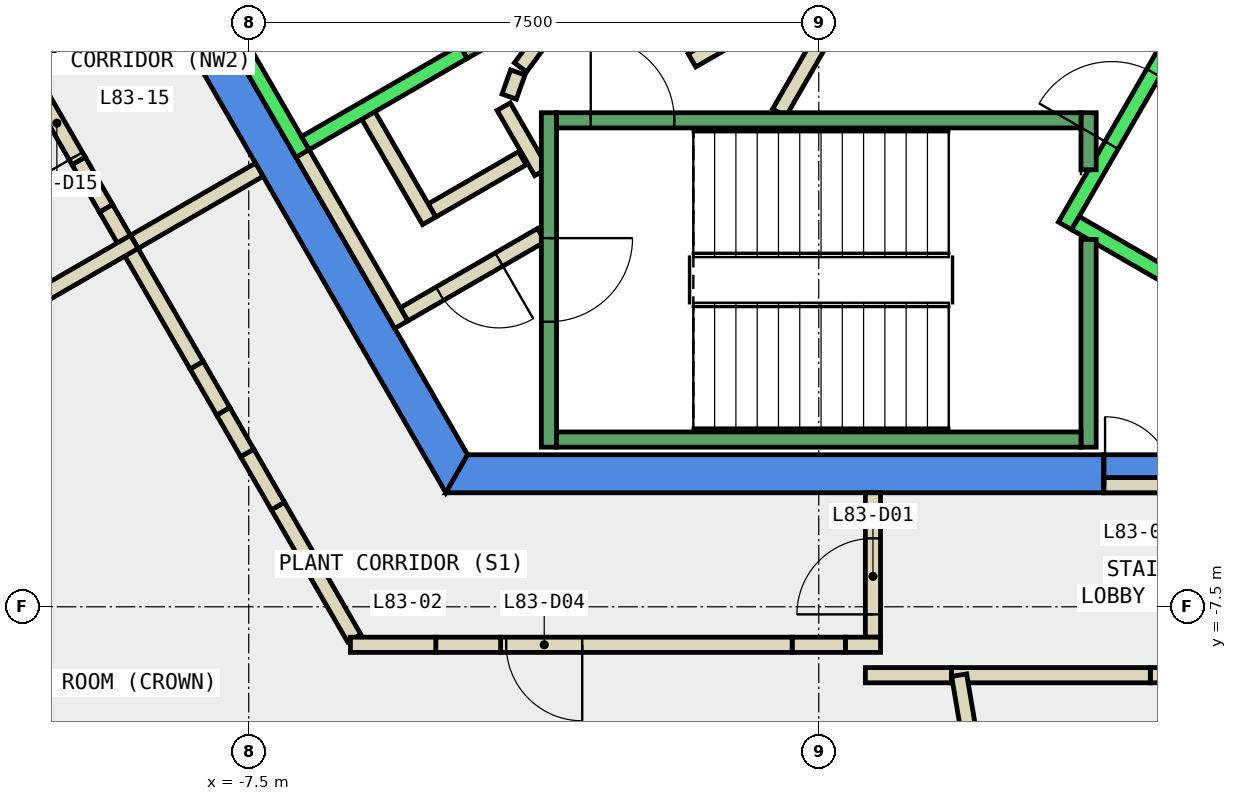
"""IFC4 building model, lengths in metres.
Left out: names, types, materials, properties, quantities, classifications, styles, units other than length and angle.
Written with IfcOpenShell. Run it as: python <this file> out.ifc"""

import sys

from ifc_helpers import new_model, si_unit, direction, frame, frame_2d, origin, place, context, subcontext, project, spatial, polyline, rectangle, outline, extrude, element, fill, save


model = new_model("IFC4")
c1 = context("Model", 3, precision=1e-05, world=origin(), true_north=direction((0.0, 1.0)))
c2 = subcontext(c1, "Body", "Model", "MODEL_VIEW")
j1 = project(units=[si_unit("LENGTHUNIT", "METRE"), si_unit("PLANEANGLEUNIT", "RADIAN")], contexts=[c1])
p1 = place(None, origin())
s1 = spatial("IfcSite", under=j1, at=p1, CompositionType="ELEMENT")
p2 = place(p1, origin())
s2 = spatial("IfcBuilding", under=s1, at=p2, CompositionType="ELEMENT")
p3 = place(p2, frame((0.0, 0.0, 353.9)))
s3 = spatial("IfcBuildingStorey", under=s2, at=p3, CompositionType="ELEMENT", Elevation=353.9)
p4 = place(p3, frame((0.0, 0.0, -0.35)))
e1 = element("IfcWall", 1, at=p4, inside=s3, PredefinedType="SHEAR", context=c2, shape_type="SweptSolid", body=[
    extrude(outline(polyline([(-9.815, 2.5), (-4.907, -6.0), (-4.619, -5.5), (-9.238, 2.5), (-9.815, 2.5)])), origin(), (0.0, 0.0, 1.0), 4.4),
])
p5 = place(p3, frame((0.0, 0.0, -0.35)))
e2 = element("IfcWall", 2, at=p5, inside=s3, PredefinedType="SHEAR", context=c2, shape_type="SweptSolid", body=[
    extrude(outline(polyline([(3.75, -6.0), (3.75, -5.5), (-4.619, -5.5), (-4.907, -6.0), (3.75, -6.0)])), origin(), (0.0, 0.0, 1.0), 4.4),
])
p6 = place(p3, frame((0.0, 0.0, 3.6)))
e3 = element("IfcWall", 3, at=p6, inside=s3, PredefinedType="SHEAR", context=c2, shape_type="SweptSolid", body=[
    extrude(outline(polyline([(4.676, -6.0), (4.676, -5.6), (4.619, -5.5), (3.75, -5.5), (3.75, -6.0), (4.676, -6.0)])), origin(), (0.0, 0.0, 1.0), 0.45),
])
p7 = place(p3, frame((-3.9, -1.599, 0.0), z_axis=(0.0, 0.0, 1.0), x_axis=(-0.865969445389, -0.500096910261, 0.0)))
e4 = element("IfcWall", 4, at=p7, inside=s3, PredefinedType="PARTITIONING", context=c2, shape_type="SweptSolid", body=[
    extrude(rectangle(XDim=1.373, YDim=0.2, at=frame_2d((0.687, 0.0))), origin(), (0.0, 0.0, 1.0), 4.05),
])
p8 = place(p3, frame((-5.126, -2.422, 0.0), z_axis=(0.0, 0.0, 1.0), x_axis=(-0.500062241894, 0.865989465428, 0.0)))
e5 = element("IfcWall", 5, at=p8, inside=s3, PredefinedType="PARTITIONING", context=c2, shape_type="SweptSolid", body=[
    extrude(rectangle(XDim=1.7, YDim=0.2, at=frame_2d((0.85, 0.0))), origin(), (0.0, 0.0, 1.0), 4.05),
])
p9 = place(p3, frame((-5.492, -3.788, 0.0), z_axis=(0.0, 0.0, 1.0), x_axis=(-0.500008949224, 0.866020236886, 0.0)))
e6 = element("IfcWall", 6, at=p9, inside=s3, PredefinedType="PARTITIONING", context=c2, shape_type="SweptSolid", body=[
    extrude(rectangle(XDim=2.68, YDim=0.2, at=frame_2d((1.34, 0.0))), origin(), (0.0, 0.0, 1.0), 4.05),
])
p10 = place(p3, frame((-4.145, -0.92, 0.0), z_axis=(0.0, 0.0, 1.0), x_axis=(0.499743786207, -0.866173278362, 0.0)))
e7 = element("IfcWall", 7, at=p10, inside=s3, PredefinedType="PARTITIONING", context=c2, shape_type="SweptSolid", body=[
    extrude(rectangle(XDim=0.991, YDim=0.2, at=frame_2d((0.495, 0.0))), origin(), (0.0, 0.0, 1.0), 4.05),
])
p11 = place(p3, frame((-3.65, -2.61, 0.0), z_axis=(0.0, 0.0, 1.0), x_axis=(-0.866072462134, -0.499918483688, 0.0)))
e8 = element("IfcWall", 8, at=p11, inside=s3, PredefinedType="PARTITIONING", context=c2, shape_type="SweptSolid", body=[
    extrude(rectangle(XDim=2.084, YDim=0.2, at=frame_2d((1.042, 0.0))), origin(), (0.0, 0.0, 1.0), 4.05),
])
p12 = place(p11, frame((0.642, 0.0, 0.0)))
e9 = element("IfcOpeningElement", 9, at=p12, cuts=e8, PredefinedType="OPENING", context=c2, shape_type="SweptSolid", body=[
    extrude(rectangle(XDim=0.9, YDim=2.1, at=frame_2d((0.45, 1.05))), frame((0.0, 0.11, 0.0), z_axis=(0.0, -1.0, 0.0), x_axis=(1.0, 0.0, 0.0)), (0.0, 0.0, 1.0), 0.22),
])
p13 = place(p3, frame((-0.52, -1.0, 0.0), z_axis=(0.0, 0.0, 1.0), x_axis=(0.50011622646, 0.865958290007, 0.0)))
e10 = element("IfcWall", 10, at=p13, inside=s3, PredefinedType="PARTITIONING", context=c2, shape_type="SweptSolid", body=[
    extrude(rectangle(XDim=4.991, YDim=0.2, at=frame_2d((2.496, 0.0))), origin(), (0.0, 0.0, 1.0), 4.05),
])
p14 = place(p13, frame((1.945, 0.0, 0.0)))
e11 = element("IfcOpeningElement", 11, at=p14, cuts=e10, PredefinedType="OPENING", context=c2, shape_type="SweptSolid", body=[
    extrude(rectangle(XDim=1.0, YDim=2.1, at=frame_2d((0.5, 1.05))), frame((0.0, 0.11, 0.0), z_axis=(0.0, -1.0, 0.0), x_axis=(1.0, 0.0, 0.0)), (0.0, 0.0, 1.0), 0.22),
])
p15 = place(p3, frame((-0.412, 0.414, 0.0), z_axis=(0.0, 0.0, 1.0), x_axis=(-0.866017369001, -0.500013916395, 0.0)))
e12 = element("IfcWall", 12, at=p15, inside=s3, PredefinedType="PARTITIONING", context=c2, shape_type="SweptSolid", body=[
    extrude(rectangle(XDim=1.45, YDim=0.2, at=frame_2d((0.725, 0.0))), origin(), (0.0, 0.0, 1.0), 4.05),
])
p16 = place(p3, frame((-3.723, -0.131, 0.0), z_axis=(0.0, 0.0, 1.0), x_axis=(-0.594675113454, -0.803966112121, 0.0)))
e13 = element("IfcWall", 13, at=p16, inside=s3, PredefinedType="PARTITIONING", context=c2, shape_type="SweptSolid", body=[
    extrude(rectangle(XDim=0.338, YDim=0.2, at=frame_2d((0.169, 0.0))), origin(), (0.0, 0.0, 1.0), 4.05),
])
p17 = place(p3, frame((-3.96, -0.47, 0.0), z_axis=(0.0, 0.0, 1.0), x_axis=(-0.334824194261, -0.942280615813, 0.0)))
e14 = element("IfcWall", 14, at=p17, inside=s3, PredefinedType="PARTITIONING", context=c2, shape_type="SweptSolid", body=[
    extrude(rectangle(XDim=0.338, YDim=0.2, at=frame_2d((0.169, 0.0))), origin(), (0.0, 0.0, 1.0), 4.05),
])
p18 = place(p3, frame((0.713, -7.9, 0.0), z_axis=(0.0, 0.0, 1.0), x_axis=(0.0, 1.0, 0.0)))
e15 = element("IfcWall", 15, at=p18, inside=s3, PredefinedType="PARTITIONING", context=c2, shape_type="SweptSolid", body=[
    extrude(rectangle(XDim=1.9, YDim=0.2, at=frame_2d((0.95, 0.0))), origin(), (0.0, 0.0, 1.0), 4.05),
])
p19 = place(p18, frame((0.3, 0.0, 0.0)))
e16 = element("IfcOpeningElement", 16, at=p19, cuts=e15, PredefinedType="OPENING", context=c2, shape_type="SweptSolid", body=[
    extrude(rectangle(XDim=1.0, YDim=2.1, at=frame_2d((0.5, 1.05))), frame((0.0, 0.11, 0.0), z_axis=(0.0, -1.0, 0.0), x_axis=(1.0, 0.0, 0.0)), (0.0, 0.0, 1.0), 0.22),
])
p20 = place(p3, frame((1.747, -8.4, 0.0), z_axis=(0.0, 0.0, 1.0), x_axis=(-1.0, 0.0, 0.0)))
e17 = element("IfcWall", 17, at=p20, inside=s3, PredefinedType="PARTITIONING", context=c2, shape_type="SweptSolid", body=[
    extrude(rectangle(XDim=1.134, YDim=0.2, at=frame_2d((0.567, 0.0))), origin(), (0.0, 0.0, 1.0), 4.05),
])
p21 = place(p3, frame((0.813, -8.0, 0.0), z_axis=(0.0, 0.0, 1.0), x_axis=(-1.0, 0.0, 0.0)))
e18 = element("IfcWall", 18, at=p21, inside=s3, PredefinedType="PARTITIONING", context=c2, shape_type="SweptSolid", body=[
    extrude(rectangle(XDim=0.463, YDim=0.2, at=frame_2d((0.231, 0.0))), origin(), (0.0, 0.0, 1.0), 4.05),
])
p22 = place(p3, frame((-6.112, -7.913, 0.0), z_axis=(0.0, 0.0, 1.0), x_axis=(-0.499957508411, 0.866049934925, 0.0)))
e19 = element("IfcWall", 19, at=p22, inside=s3, PredefinedType="PARTITIONING", context=c2, shape_type="SweptSolid", body=[
    extrude(rectangle(XDim=2.008, YDim=0.2, at=frame_2d((1.004, 0.0))), origin(), (0.0, 0.0, 1.0), 4.05),
])
p23 = place(p3, frame((-9.006, -2.7, 0.0), z_axis=(0.0, 0.0, 1.0), x_axis=(0.865980106173, 0.500078449558, 0.0)))
e20 = element("IfcWall", 20, at=p23, inside=s3, PredefinedType="PARTITIONING", context=c2, shape_type="SweptSolid", body=[
    extrude(rectangle(XDim=1.9, YDim=0.2, at=frame_2d((0.95, 0.0))), origin(), (0.0, 0.0, 1.0), 4.05),
])
p24 = place(p3, frame((-9.093, -2.75, 0.0), z_axis=(0.0, 0.0, 1.0), x_axis=(-0.500427620203, 0.86577837634, 0.0)))
e21 = element("IfcWall", 21, at=p24, inside=s3, PredefinedType="PARTITIONING", context=c2, shape_type="SweptSolid", body=[
    extrude(rectangle(XDim=0.569, YDim=0.2, at=frame_2d((0.285, 0.0))), origin(), (0.0, 0.0, 1.0), 4.05),
])
p25 = place(p3, frame((3.75, -5.9, 0.0), z_axis=(0.0, 0.0, 1.0), x_axis=(1.0, 0.0, 0.0)))
e22 = element("IfcWall", 22, at=p25, inside=s3, PredefinedType="PARTITIONING", context=c2, shape_type="SweptSolid", body=[
    extrude(rectangle(XDim=0.926, YDim=0.2, at=frame_2d((0.463, 0.0))), origin(), (0.0, 0.0, 1.0), 2.4),
])
p26 = place(p25, frame((0.017, 0.0, 0.0)))
e23 = element("IfcOpeningElement", 23, at=p26, cuts=e22, PredefinedType="OPENING", context=c2, shape_type="SweptSolid", body=[
    extrude(rectangle(XDim=0.9, YDim=2.1, at=frame_2d((0.45, 1.05))), frame((0.0, 0.11, 0.0), z_axis=(0.0, -1.0, 0.0), x_axis=(1.0, 0.0, 0.0)), (0.0, 0.0, 1.0), 0.22),
])
p27 = place(p3, frame((5.215, -8.4, 0.0), z_axis=(0.0, 0.0, 1.0), x_axis=(-1.0, 0.0, 0.0)))
e24 = element("IfcWall", 24, at=p27, inside=s3, PredefinedType="PARTITIONING", context=c2, shape_type="SweptSolid", body=[
    extrude(rectangle(XDim=0.853, YDim=0.2, at=frame_2d((0.427, 0.0))), origin(), (0.0, 0.0, 1.0), 1.95),
])
p28 = place(p3, frame((4.362, -8.4, 0.0), z_axis=(0.0, 0.0, 1.0), x_axis=(-1.0, 0.0, 0.0)))
e25 = element("IfcWall", 25, at=p28, inside=s3, PredefinedType="PARTITIONING", context=c2, shape_type="SweptSolid", body=[
    extrude(rectangle(XDim=2.615, YDim=0.2, at=frame_2d((1.308, 0.0))), origin(), (0.0, 0.0, 1.0), 4.05),
])
p29 = place(p3, frame((0.35, -8.0, 0.0), z_axis=(0.0, 0.0, 1.0), x_axis=(-1.0, 0.0, 0.0)))
e26 = element("IfcWall", 26, at=p29, inside=s3, PredefinedType="PARTITIONING", context=c2, shape_type="SweptSolid", body=[
    extrude(rectangle(XDim=0.7, YDim=0.2, at=frame_2d((0.35, 0.0))), origin(), (0.0, 0.0, 1.0), 1.95),
])
p30 = place(p3, frame((-0.35, -8.0, 0.0), z_axis=(0.0, 0.0, 1.0), x_axis=(-1.0, 0.0, 0.0)))
e27 = element("IfcWall", 27, at=p30, inside=s3, PredefinedType="PARTITIONING", context=c2, shape_type="SweptSolid", body=[
    extrude(rectangle(XDim=3.836, YDim=0.2, at=frame_2d((1.918, 0.0))), origin(), (0.0, 0.0, 1.0), 4.05),
])
p31 = place(p30, frame((2.762, 0.0, 0.0)))
e28 = element("IfcOpeningElement", 28, at=p31, cuts=e27, PredefinedType="OPENING", context=c2, shape_type="SweptSolid", body=[
    extrude(rectangle(XDim=1.0, YDim=2.1, at=frame_2d((0.5, 1.05))), frame((0.0, 0.11, 0.0), z_axis=(0.0, -1.0, 0.0), x_axis=(1.0, 0.0, 0.0)), (0.0, 0.0, 1.0), 0.22),
])
p32 = place(p3, frame((-4.186, -8.0, 0.0), z_axis=(0.0, 0.0, 1.0), x_axis=(-1.0, 0.0, 0.0)))
e29 = element("IfcWall", 29, at=p32, inside=s3, PredefinedType="PARTITIONING", context=c2, shape_type="SweptSolid", body=[
    extrude(rectangle(XDim=0.853, YDim=0.2, at=frame_2d((0.427, 0.0))), origin(), (0.0, 0.0, 1.0), 1.95),
])
p33 = place(p3, frame((-5.039, -8.0, 0.0), z_axis=(0.0, 0.0, 1.0), x_axis=(-1.0, 0.0, 0.0)))
e30 = element("IfcWall", 30, at=p33, inside=s3, PredefinedType="PARTITIONING", context=c2, shape_type="SweptSolid", body=[
    extrude(rectangle(XDim=1.123, YDim=0.2, at=frame_2d((0.562, 0.0))), origin(), (0.0, 0.0, 1.0), 4.05),
])
p34 = place(p3, frame((-7.116, -6.174, 0.0), z_axis=(0.0, 0.0, 1.0), x_axis=(-0.500463994258, 0.865757350792, 0.0)))
e31 = element("IfcWall", 31, at=p34, inside=s3, PredefinedType="PARTITIONING", context=c2, shape_type="SweptSolid", body=[
    extrude(rectangle(XDim=0.807, YDim=0.2, at=frame_2d((0.404, 0.0))), origin(), (0.0, 0.0, 1.0), 1.95),
])
p35 = place(p3, frame((-7.52, -5.475, 0.0), z_axis=(0.0, 0.0, 1.0), x_axis=(-0.49888522925, 0.866668061046, 0.0)))
e32 = element("IfcWall", 32, at=p35, inside=s3, PredefinedType="PARTITIONING", context=c2, shape_type="SweptSolid", body=[
    extrude(rectangle(XDim=0.631, YDim=0.2, at=frame_2d((0.316, 0.0))), origin(), (0.0, 0.0, 1.0), 4.05),
])
p36 = place(p3, frame((-7.835, -4.928, 0.0), z_axis=(0.0, 0.0, 1.0), x_axis=(-0.500265973451, 0.865871789474, 0.0)))
e33 = element("IfcWall", 33, at=p36, inside=s3, PredefinedType="PARTITIONING", context=c2, shape_type="SweptSolid", body=[
    extrude(rectangle(XDim=0.7, YDim=0.2, at=frame_2d((0.35, 0.0))), origin(), (0.0, 0.0, 1.0), 1.95),
])
p37 = place(p3, frame((-8.185, -4.322, 0.0), z_axis=(0.0, 0.0, 1.0), x_axis=(-0.500145398563, 0.865941441609, 0.0)))
e34 = element("IfcWall", 34, at=p37, inside=s3, PredefinedType="PARTITIONING", context=c2, shape_type="SweptSolid", body=[
    extrude(rectangle(XDim=1.815, YDim=0.2, at=frame_2d((0.908, 0.0))), origin(), (0.0, 0.0, 1.0), 4.05),
])
p38 = place(p3, frame((2.482, -12.149, 0.0), z_axis=(0.0, 0.0, 1.0), x_axis=(-0.167001385459, 0.985956660941, 0.0)))
e35 = element("IfcWall", 35, at=p38, inside=s3, PredefinedType="PARTITIONING", context=c2, shape_type="SweptSolid", body=[
    extrude(rectangle(XDim=3.802, YDim=0.2, at=frame_2d((1.901, 0.0))), origin(), (0.0, 0.0, 1.0), 4.05),
])
p39 = place(p3, frame((-16.43, -6.986, 0.0), z_axis=(0.0, 0.0, 1.0), x_axis=(0.866026229868, 0.499998569178, 0.0)))
e36 = element("IfcWall", 36, at=p39, inside=s3, PredefinedType="PARTITIONING", context=c2, shape_type="SweptSolid", body=[
    extrude(rectangle(XDim=8.572, YDim=0.2, at=frame_2d((4.286, 0.0))), origin(), (0.0, 0.0, 1.0), 4.05),
])
p40 = place(p3, frame((-9.378, -2.257, 0.0), z_axis=(0.0, 0.0, 1.0), x_axis=(-0.499820234884, 0.866129166349, 0.0)))
e37 = element("IfcWall", 37, at=p40, inside=s3, PredefinedType="PARTITIONING", context=c2, shape_type="SweptSolid", body=[
    extrude(rectangle(XDim=0.72, YDim=0.2, at=frame_2d((0.36, 0.0))), origin(), (0.0, 0.0, 1.0), 1.95),
])
p41 = place(p3, frame((-9.738, -1.633, 0.0), z_axis=(0.0, 0.0, 1.0), x_axis=(-0.500238469565, 0.865887679533, 0.0)))
e38 = element("IfcWall", 38, at=p41, inside=s3, PredefinedType="PARTITIONING", context=c2, shape_type="SweptSolid", body=[
    extrude(rectangle(XDim=1.351, YDim=0.2, at=frame_2d((0.676, 0.0))), origin(), (0.0, 0.0, 1.0), 4.05),
])
p42 = place(p41, frame((0.072, 0.0, 0.0)))
e39 = element("IfcOpeningElement", 39, at=p42, cuts=e38, PredefinedType="OPENING", context=c2, shape_type="SweptSolid", body=[
    extrude(rectangle(XDim=1.0, YDim=2.1, at=frame_2d((0.5, 1.05))), frame((0.0, 0.11, 0.0), z_axis=(0.0, -1.0, 0.0), x_axis=(1.0, 0.0, 0.0)), (0.0, 0.0, 1.0), 0.22),
])
p43 = place(p3, frame((-5.94, 2.188, 0.0), z_axis=(0.0, 0.0, 1.0), x_axis=(0.49994636267, -0.866056369097, 0.0)))
e40 = element("IfcWall", 40, at=p43, inside=s3, PredefinedType="STANDARD", context=c2, shape_type="SweptSolid", body=[
    extrude(rectangle(XDim=2.8, YDim=0.2, at=frame_2d((1.4, 0.0))), origin(), (0.0, 0.0, 1.0), 4.05),
])
p44 = place(p43, frame((1.225, 0.0, 0.0)))
e41 = element("IfcOpeningElement", 41, at=p44, cuts=e40, PredefinedType="OPENING", context=c2, shape_type="SweptSolid", body=[
    extrude(rectangle(XDim=1.1, YDim=2.1, at=frame_2d((0.55, 1.05))), frame((0.0, 0.11, 0.0), z_axis=(0.0, -1.0, 0.0), x_axis=(1.0, 0.0, 0.0)), (0.0, 0.0, 1.0), 0.22),
])
p45 = place(p3, frame((-8.192, 0.888, 0.0), z_axis=(0.0, 0.0, 1.0), x_axis=(0.49994636267, -0.866056369097, 0.0)))
e42 = element("IfcWall", 42, at=p45, inside=s3, PredefinedType="STANDARD", context=c2, shape_type="SweptSolid", body=[
    extrude(rectangle(XDim=2.8, YDim=0.2, at=frame_2d((1.4, 0.0))), origin(), (0.0, 0.0, 1.0), 4.05),
])
p46 = place(p3, frame((-4.677, -0.2, 0.0), z_axis=(0.0, 0.0, 1.0), x_axis=(-0.865973769406, -0.500089422704, 0.0)))
e43 = element("IfcWall", 43, at=p46, inside=s3, PredefinedType="STANDARD", context=c2, shape_type="SweptSolid", body=[
    extrude(rectangle(XDim=2.399, YDim=0.2, at=frame_2d((1.2, 0.0))), origin(), (0.0, 0.0, 1.0), 4.05),
])
p47 = place(p3, frame((3.24, -2.488, 0.0), z_axis=(0.0, 0.0, 1.0), x_axis=(0.49994636267, 0.866056369097, 0.0)))
e44 = element("IfcWall", 44, at=p47, inside=s3, PredefinedType="STANDARD", context=c2, shape_type="SweptSolid", body=[
    extrude(rectangle(XDim=2.8, YDim=0.2, at=frame_2d((1.4, 0.0))), origin(), (0.0, 0.0, 1.0), 4.05),
])
p48 = place(p47, frame((1.225, 0.0, 0.0)))
e45 = element("IfcOpeningElement", 45, at=p48, cuts=e44, PredefinedType="OPENING", context=c2, shape_type="SweptSolid", body=[
    extrude(rectangle(XDim=1.1, YDim=2.1, at=frame_2d((0.55, 1.05))), frame((0.0, 0.11, 0.0), z_axis=(0.0, -1.0, 0.0), x_axis=(1.0, 0.0, 0.0)), (0.0, 0.0, 1.0), 0.22),
])
p49 = place(p3, frame((3.377, -2.452, 0.0), z_axis=(0.0, 0.0, 1.0), x_axis=(0.865955154139, -0.50012165622, 0.0)))
e46 = element("IfcWall", 46, at=p49, inside=s3, PredefinedType="STANDARD", context=c2, shape_type="SweptSolid", body=[
    extrude(rectangle(XDim=2.4, YDim=0.2, at=frame_2d((1.2, 0.0))), origin(), (0.0, 0.0, 1.0), 4.05),
])
p50 = place(p3, frame((-3.55, -1.0, 0.0), z_axis=(0.0, 0.0, 1.0), x_axis=(0.0, -1.0, 0.0)))
e47 = element("IfcWall", 47, at=p50, inside=s3, PredefinedType="STANDARD", context=c2, shape_type="SweptSolid", body=[
    extrude(rectangle(XDim=4.4, YDim=0.2, at=frame_2d((2.2, 0.0))), origin(), (0.0, 0.0, 1.0), 4.05),
])
p51 = place(p50, frame((1.65, 0.0, 0.0)))
e48 = element("IfcOpeningElement", 48, at=p51, cuts=e47, PredefinedType="OPENING", context=c2, shape_type="SweptSolid", body=[
    extrude(rectangle(XDim=1.1, YDim=2.2, at=frame_2d((0.55, 1.1))), frame((0.0, 0.11, 0.0), z_axis=(0.0, -1.0, 0.0), x_axis=(1.0, 0.0, 0.0)), (0.0, 0.0, 1.0), 0.22),
])
p52 = place(p3, frame((3.55, -2.667, 0.0), z_axis=(0.0, 0.0, 1.0), x_axis=(0.0, -1.0, 0.0)))
e49 = element("IfcWall", 49, at=p52, inside=s3, PredefinedType="STANDARD", context=c2, shape_type="SweptSolid", body=[
    extrude(rectangle(XDim=2.733, YDim=0.2, at=frame_2d((1.366, 0.0))), origin(), (0.0, 0.0, 1.0), 4.05),
])
p53 = place(p3, frame((3.55, -1.0, 0.0), z_axis=(0.0, 0.0, 1.0), x_axis=(0.0, -1.0, 0.0)))
e50 = element("IfcWall", 50, at=p53, inside=s3, PredefinedType="STANDARD", context=c2, shape_type="SweptSolid", body=[
    extrude(rectangle(XDim=0.751, YDim=0.2, at=frame_2d((0.375, 0.0))), origin(), (0.0, 0.0, 1.0), 4.05),
])
p54 = place(p3, frame((-3.45, -1.1, 0.0), z_axis=(0.0, 0.0, 1.0), x_axis=(1.0, 0.0, 0.0)))
e51 = element("IfcWall", 51, at=p54, inside=s3, PredefinedType="STANDARD", context=c2, shape_type="SweptSolid", body=[
    extrude(rectangle(XDim=6.9, YDim=0.2, at=frame_2d((3.45, 0.0))), origin(), (0.0, 0.0, 1.0), 4.05),
])
p55 = place(p54, frame((0.45, 0.0, 0.0)))
e52 = element("IfcOpeningElement", 52, at=p55, cuts=e51, PredefinedType="OPENING", context=c2, shape_type="SweptSolid", body=[
    extrude(rectangle(XDim=1.1, YDim=2.2, at=frame_2d((0.55, 1.1))), frame((0.0, 0.11, 0.0), z_axis=(0.0, -1.0, 0.0), x_axis=(1.0, 0.0, 0.0)), (0.0, 0.0, 1.0), 0.22),
])
p56 = place(p3, frame((-3.45, -5.3, 0.0), z_axis=(0.0, 0.0, 1.0), x_axis=(1.0, 0.0, 0.0)))
e53 = element("IfcWall", 53, at=p56, inside=s3, PredefinedType="STANDARD", context=c2, shape_type="SweptSolid", body=[
    extrude(rectangle(XDim=6.9, YDim=0.2, at=frame_2d((3.45, 0.0))), origin(), (0.0, 0.0, 1.0), 4.05),
])
p57 = place(p19, origin())
e54 = element("IfcDoor", 54, at=p57, inside=s3, OperationType="SINGLE_SWING_LEFT", PredefinedType="DOOR", context=c2, shape_type="SweptSolid", body=[
    extrude(rectangle(XDim=1.0, YDim=2.1, at=frame_2d((0.5, 1.05))), frame((0.0, 0.025, 0.0), z_axis=(0.0, -1.0, 0.0), x_axis=(1.0, 0.0, 0.0)), (0.0, 0.0, 1.0), 0.05),
])
fill(e16, e54)
p58 = place(p31, origin())
e55 = element("IfcDoor", 55, at=p58, inside=s3, OperationType="SINGLE_SWING_RIGHT", PredefinedType="DOOR", context=c2, shape_type="SweptSolid", body=[
    extrude(rectangle(XDim=1.0, YDim=2.1, at=frame_2d((0.5, 1.05))), frame((0.0, 0.025, 0.0), z_axis=(0.0, -1.0, 0.0), x_axis=(1.0, 0.0, 0.0)), (0.0, 0.0, 1.0), 0.05),
])
fill(e28, e55)
p59 = place(p42, origin())
e56 = element("IfcDoor", 56, at=p59, inside=s3, OperationType="SINGLE_SWING_LEFT", PredefinedType="DOOR", context=c2, shape_type="SweptSolid", body=[
    extrude(rectangle(XDim=1.0, YDim=2.1, at=frame_2d((0.5, 1.05))), frame((0.0, 0.025, 0.0), z_axis=(0.0, -1.0, 0.0), x_axis=(1.0, 0.0, 0.0)), (0.0, 0.0, 1.0), 0.05),
])
fill(e39, e56)
p60 = place(p12, origin())
e57 = element("IfcDoor", 57, at=p60, inside=s3, OperationType="SINGLE_SWING_LEFT", PredefinedType="DOOR", context=c2, shape_type="SweptSolid", body=[
    extrude(rectangle(XDim=0.9, YDim=2.1, at=frame_2d((0.45, 1.05))), frame((0.0, 0.025, 0.0), z_axis=(0.0, -1.0, 0.0), x_axis=(1.0, 0.0, 0.0)), (0.0, 0.0, 1.0), 0.05),
])
fill(e9, e57)
p61 = place(p26, origin())
e58 = element("IfcDoor", 58, at=p61, inside=s3, OperationType="SINGLE_SWING_LEFT", PredefinedType="DOOR", context=c2, shape_type="SweptSolid", body=[
    extrude(rectangle(XDim=0.9, YDim=2.1, at=frame_2d((0.45, 1.05))), frame((0.0, 0.025, 0.0), z_axis=(0.0, -1.0, 0.0), x_axis=(1.0, 0.0, 0.0)), (0.0, 0.0, 1.0), 0.05),
])
fill(e23, e58)
p62 = place(p48, origin())
e59 = element("IfcDoor", 59, at=p62, inside=s3, OperationType="SLIDING_TO_LEFT", PredefinedType="DOOR", context=c2, shape_type="SweptSolid", body=[
    extrude(rectangle(XDim=1.1, YDim=2.1, at=frame_2d((0.55, 1.05))), frame((0.0, 0.025, 0.0), z_axis=(0.0, -1.0, 0.0), x_axis=(1.0, 0.0, 0.0)), (0.0, 0.0, 1.0), 0.05),
])
fill(e45, e59)
p63 = place(p55, origin())
e60 = element("IfcDoor", 60, at=p63, inside=s3, OperationType="SINGLE_SWING_LEFT", PredefinedType="DOOR", context=c2, shape_type="SweptSolid", body=[
    extrude(rectangle(XDim=1.1, YDim=2.2, at=frame_2d((0.55, 1.1))), frame((0.0, 0.025, 0.0), z_axis=(0.0, -1.0, 0.0), x_axis=(1.0, 0.0, 0.0)), (0.0, 0.0, 1.0), 0.05),
])
fill(e52, e60)
p64 = place(p51, origin())
e61 = element("IfcDoor", 61, at=p64, inside=s3, OperationType="SINGLE_SWING_LEFT", PredefinedType="DOOR", context=c2, shape_type="SweptSolid", body=[
    extrude(rectangle(XDim=1.1, YDim=2.2, at=frame_2d((0.55, 1.1))), frame((0.0, 0.025, 0.0), z_axis=(0.0, -1.0, 0.0), x_axis=(1.0, 0.0, 0.0)), (0.0, 0.0, 1.0), 0.05),
])
fill(e48, e61)
save(model, sys.argv[1])
